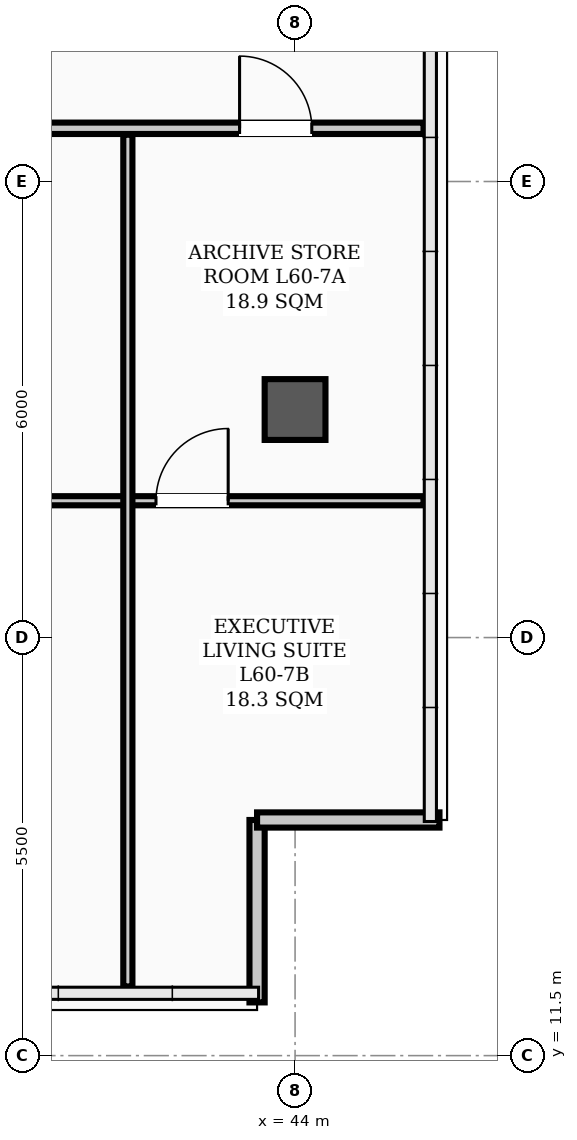
"""IFC4 building model, lengths in metres.
Left out: names, types, materials, properties, quantities, classifications, styles, units other than length and angle.
Written with IfcOpenShell. Run it as: python <this file> out.ifc"""

import sys

from ifc_helpers import new_model, si_unit, direction, frame, frame_2d, origin, origin_2d, place, context, subcontext, project, spatial, rectangle, hollow_rectangle, extrude, element, fill, save


model = new_model("IFC4")
c1 = context("Model", 3, precision=1e-05, world=origin(), true_north=direction((0.0, 1.0)))
c2 = subcontext(c1, "Body", "Model", "MODEL_VIEW")
j1 = project(units=[si_unit("LENGTHUNIT", "METRE"), si_unit("PLANEANGLEUNIT", "RADIAN")], contexts=[c1])
p1 = place(None, origin())
s1 = spatial("IfcSite", under=j1, at=p1, CompositionType="ELEMENT")
p2 = place(p1, origin())
s2 = spatial("IfcBuilding", under=s1, at=p2, CompositionType="ELEMENT")
p3 = place(p2, frame((0.0, 0.0, 242.3)))
s3 = spatial("IfcBuildingStorey", under=s2, at=p3, CompositionType="ELEMENT", Elevation=242.3)
p4 = place(p3, frame((44.0, 20.0, 0.0), z_axis=(0.0, 0.0, 1.0), x_axis=(1.0, 0.0, 0.0)))
e1 = element("IfcColumn", 1, at=p4, inside=s3, PredefinedType="COLUMN", context=c2, shape_type="SweptSolid", body=[
    extrude(hollow_rectangle(XDim=0.8, YDim=0.8, WallThickness=0.032, InnerFilletRadius=0.016, OuterFilletRadius=0.048, at=origin_2d()), origin(), (0.0, 0.0, 1.0), 3.9),
])
p5 = place(p3, frame((43.5, 12.2, 0.0), z_axis=(0.0, 0.0, 1.0), x_axis=(0.0, 1.0, 0.0)))
e2 = element("IfcWall", 2, at=p5, inside=s3, PredefinedType="PARAPET", context=c2, shape_type="SweptSolid", body=[
    extrude(rectangle(XDim=2.4, YDim=0.2, at=frame_2d((1.2, 0.0))), origin(), (0.0, 0.0, 1.0), 1.2),
])
p6 = place(p3, frame((43.5, 14.6, 0.0), z_axis=(0.0, 0.0, 1.0), x_axis=(1.0, 0.0, 0.0)))
e3 = element("IfcWall", 3, at=p6, inside=s3, PredefinedType="PARAPET", context=c2, shape_type="SweptSolid", body=[
    extrude(rectangle(XDim=2.4, YDim=0.2, at=frame_2d((1.2, 0.0))), origin(), (0.0, 0.0, 1.0), 1.2),
])
p7 = place(p3, frame((4.81, 23.7, 0.0), z_axis=(0.0, 0.0, 1.0), x_axis=(1.0, 0.0, 0.0)))
e4 = element("IfcWall", 4, at=p7, inside=s3, PredefinedType="PARTITIONING", context=c2, shape_type="SweptSolid", body=[
    extrude(rectangle(XDim=40.88, YDim=0.15, at=frame_2d((20.44, 0.0))), origin(), (0.0, 0.0, 1.0), 3.2),
])
p8 = place(p7, frame((5.865, 0.0, 0.0)))
e5 = element("IfcOpeningElement", 5, at=p8, cuts=e4, PredefinedType="OPENING", context=c2, shape_type="SweptSolid", body=[
    extrude(rectangle(XDim=0.95, YDim=2.08, at=frame_2d((0.475, 1.04))), frame((0.0, 0.085, 0.0), z_axis=(0.0, -1.0, 0.0), x_axis=(1.0, 0.0, 0.0)), (0.0, 0.0, 1.0), 0.17),
])
p9 = place(p7, frame((13.115, 0.0, 0.0)))
e6 = element("IfcOpeningElement", 6, at=p9, cuts=e4, PredefinedType="OPENING", context=c2, shape_type="SweptSolid", body=[
    extrude(rectangle(XDim=0.95, YDim=2.08, at=frame_2d((0.475, 1.04))), frame((0.0, 0.085, 0.0), z_axis=(0.0, -1.0, 0.0), x_axis=(1.0, 0.0, 0.0)), (0.0, 0.0, 1.0), 0.17),
])
p10 = place(p7, frame((16.515, 0.0, 0.0)))
e7 = element("IfcOpeningElement", 7, at=p10, cuts=e4, PredefinedType="OPENING", context=c2, shape_type="SweptSolid", body=[
    extrude(rectangle(XDim=0.95, YDim=2.08, at=frame_2d((0.475, 1.04))), frame((0.0, 0.085, 0.0), z_axis=(0.0, -1.0, 0.0), x_axis=(1.0, 0.0, 0.0)), (0.0, 0.0, 1.0), 0.17),
])
p11 = place(p7, frame((22.915, 0.0, 0.0)))
e8 = element("IfcOpeningElement", 8, at=p11, cuts=e4, PredefinedType="OPENING", context=c2, shape_type="SweptSolid", body=[
    extrude(rectangle(XDim=0.95, YDim=2.08, at=frame_2d((0.475, 1.04))), frame((0.0, 0.085, 0.0), z_axis=(0.0, -1.0, 0.0), x_axis=(1.0, 0.0, 0.0)), (0.0, 0.0, 1.0), 0.17),
])
p12 = place(p7, frame((29.115, 0.0, 0.0)))
e9 = element("IfcOpeningElement", 9, at=p12, cuts=e4, PredefinedType="OPENING", context=c2, shape_type="SweptSolid", body=[
    extrude(rectangle(XDim=0.95, YDim=2.08, at=frame_2d((0.475, 1.04))), frame((0.0, 0.085, 0.0), z_axis=(0.0, -1.0, 0.0), x_axis=(1.0, 0.0, 0.0)), (0.0, 0.0, 1.0), 0.17),
])
p13 = place(p7, frame((34.215, 0.0, 0.0)))
e10 = element("IfcOpeningElement", 10, at=p13, cuts=e4, PredefinedType="OPENING", context=c2, shape_type="SweptSolid", body=[
    extrude(rectangle(XDim=0.95, YDim=2.08, at=frame_2d((0.475, 1.04))), frame((0.0, 0.085, 0.0), z_axis=(0.0, -1.0, 0.0), x_axis=(1.0, 0.0, 0.0)), (0.0, 0.0, 1.0), 0.17),
])
p14 = place(p7, frame((38.46, 0.0, 0.0)))
e11 = element("IfcOpeningElement", 11, at=p14, cuts=e4, PredefinedType="OPENING", context=c2, shape_type="SweptSolid", body=[
    extrude(rectangle(XDim=0.95, YDim=2.08, at=frame_2d((0.475, 1.04))), frame((0.0, 0.085, 0.0), z_axis=(0.0, -1.0, 0.0), x_axis=(1.0, 0.0, 0.0)), (0.0, 0.0, 1.0), 0.17),
])
p15 = place(p3, frame((37.2, 18.8, 0.0), z_axis=(0.0, 0.0, 1.0), x_axis=(1.0, 0.0, 0.0)))
e12 = element("IfcWall", 12, at=p15, inside=s3, PredefinedType="PARTITIONING", context=c2, shape_type="SweptSolid", body=[
    extrude(rectangle(XDim=4.6, YDim=0.12, at=frame_2d((2.3, 0.0))), origin(), (0.0, 0.0, 1.0), 3.2),
])
p16 = place(p15, frame((1.825, 0.0, 0.0)))
e13 = element("IfcOpeningElement", 13, at=p16, cuts=e12, PredefinedType="OPENING", context=c2, shape_type="SweptSolid", body=[
    extrude(rectangle(XDim=0.95, YDim=2.08, at=frame_2d((0.475, 1.04))), frame((0.0, 0.07, 0.0), z_axis=(0.0, -1.0, 0.0), x_axis=(1.0, 0.0, 0.0)), (0.0, 0.0, 1.0), 0.14),
])
p17 = place(p3, frame((41.8, 18.8, 0.0), z_axis=(0.0, 0.0, 1.0), x_axis=(1.0, 0.0, 0.0)))
e14 = element("IfcWall", 14, at=p17, inside=s3, PredefinedType="PARTITIONING", context=c2, shape_type="SweptSolid", body=[
    extrude(rectangle(XDim=3.89, YDim=0.12, at=frame_2d((1.945, 0.0))), origin(), (0.0, 0.0, 1.0), 3.72),
])
p18 = place(p17, frame((0.37, 0.0, 0.0)))
e15 = element("IfcOpeningElement", 15, at=p18, cuts=e14, PredefinedType="OPENING", context=c2, shape_type="SweptSolid", body=[
    extrude(rectangle(XDim=0.95, YDim=2.08, at=frame_2d((0.475, 1.04))), frame((0.0, 0.07, 0.0), z_axis=(0.0, -1.0, 0.0), x_axis=(1.0, 0.0, 0.0)), (0.0, 0.0, 1.0), 0.14),
])
p19 = place(p3, frame((41.8, 12.41, 0.0), z_axis=(0.0, 0.0, 1.0), x_axis=(0.0, 1.0, 0.0)))
e16 = element("IfcWall", 16, at=p19, inside=s3, PredefinedType="PARTITIONING", context=c2, shape_type="SweptSolid", body=[
    extrude(rectangle(XDim=11.205, YDim=0.12, at=frame_2d((5.603, 0.0))), origin(), (0.0, 0.0, 1.0), 3.72),
])
p20 = place(p18, origin())
e17 = element("IfcDoor", 17, at=p20, inside=s3, OperationType="SINGLE_SWING_RIGHT", PredefinedType="DOOR", context=c2, shape_type="SweptSolid", body=[
    extrude(rectangle(XDim=0.95, YDim=2.08, at=frame_2d((0.475, 1.04))), frame((0.0, 0.025, 0.0), z_axis=(0.0, -1.0, 0.0), x_axis=(1.0, 0.0, 0.0)), (0.0, 0.0, 1.0), 0.05),
])
fill(e15, e17)
p21 = place(p14, origin())
e18 = element("IfcDoor", 18, at=p21, inside=s3, OperationType="SINGLE_SWING_LEFT", PredefinedType="DOOR", context=c2, shape_type="SweptSolid", body=[
    extrude(rectangle(XDim=0.95, YDim=2.08, at=frame_2d((0.475, 1.04))), frame((0.0, 0.025, 0.0), z_axis=(0.0, -1.0, 0.0), x_axis=(1.0, 0.0, 0.0)), (0.0, 0.0, 1.0), 0.05),
])
fill(e11, e18)
save(model, sys.argv[1])
